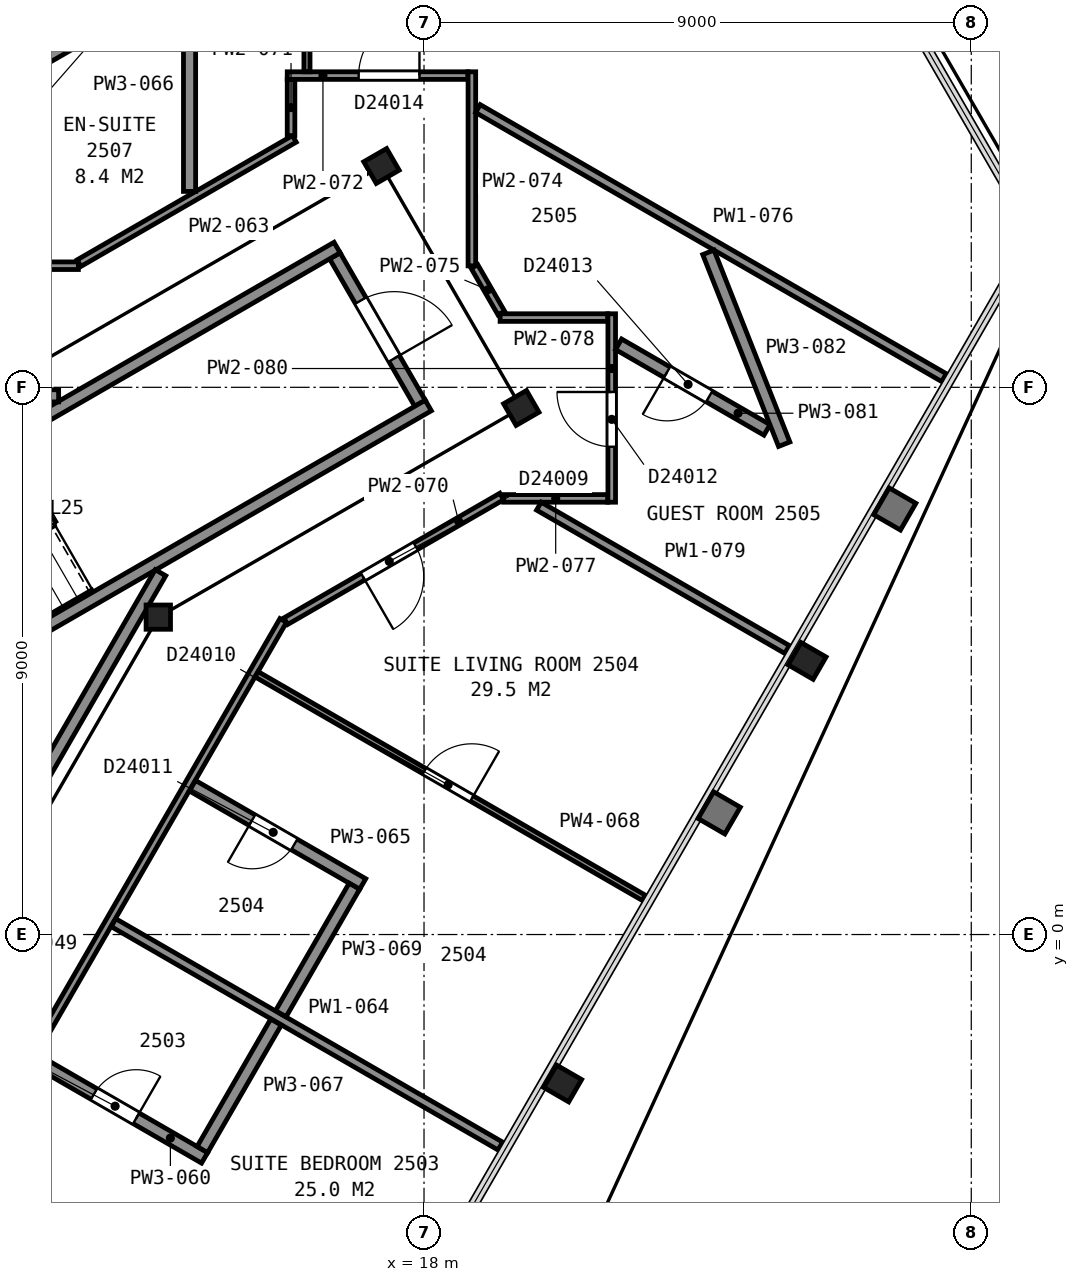
"""IFC4 building model, lengths in metres.
Left out: names, types, materials, properties, quantities, classifications, styles, units other than length and angle.
Written with IfcOpenShell. Run it as: python <this file> out.ifc"""

import sys

from ifc_helpers import new_model, si_unit, direction, frame, frame_2d, origin, origin_2d, place, context, subcontext, project, spatial, rectangle, i_section, extrude, element, fill, save


model = new_model("IFC4")
c1 = context("Model", 3, precision=1e-05, world=origin(), true_north=direction((0.0, 1.0)))
c2 = subcontext(c1, "Body", "Model", "MODEL_VIEW")
j1 = project(units=[si_unit("LENGTHUNIT", "METRE"), si_unit("PLANEANGLEUNIT", "RADIAN")], contexts=[c1])
p1 = place(None, origin())
s1 = spatial("IfcSite", under=j1, at=p1, CompositionType="ELEMENT")
p2 = place(p1, origin())
s2 = spatial("IfcBuilding", under=s1, at=p2, CompositionType="ELEMENT")
p3 = place(p2, frame((0.0, 0.0, 107.2)))
s3 = spatial("IfcBuildingStorey", under=s2, at=p3, CompositionType="ELEMENT", Elevation=107.2)
for number, where, z_axis, x_axis in (
    (1, (20.28, -2.45, 0.0), (0.0, 0.0, 1.0), (-0.5, -0.866, 0.0)),
    (2, (24.3, 4.5, 0.0), (0.0, 0.0, 1.0), (-0.5, -0.866, 0.0)),
):
    element("IfcColumn", number, at=place(p3, frame(where, z_axis=z_axis, x_axis=x_axis)), inside=s3, PredefinedType="COLUMN", context=c2, shape_type="SweptSolid", body=[
        extrude(i_section(OverallWidth=0.424, OverallDepth=0.475, WebThickness=0.048, FlangeThickness=0.077, FilletRadius=0.015, at=origin_2d()), origin(), (0.0, 0.0, 1.0), 3.6),
    ])
p4 = place(p3, frame((13.63, 5.22, 0.0), z_axis=(0.0, 0.0, 1.0), x_axis=(1.0, 0.0, 0.0)))
e3 = element("IfcColumn", 3, at=p4, inside=s3, PredefinedType="COLUMN", context=c2, shape_type="SweptSolid", body=[
    extrude(i_section(OverallWidth=0.401, OverallDepth=0.399, WebThickness=0.025, FlangeThickness=0.04, FilletRadius=0.015, at=origin_2d()), origin(), (0.0, 0.0, 1.0), 3.6),
])
for number, where, z_axis, x_axis in (
    (4, (19.6, 8.66, 0.0), (0.0, 0.0, 1.0), (0.5, -0.866, 0.0)),
    (5, (17.3, 12.64, 0.0), (0.0, 0.0, 1.0), (0.5, -0.866, 0.0)),
):
    element("IfcColumn", number, at=place(p3, frame(where, z_axis=z_axis, x_axis=x_axis)), inside=s3, PredefinedType="COLUMN", context=c2, shape_type="SweptSolid", body=[
        extrude(i_section(OverallWidth=0.411, OverallDepth=0.434, WebThickness=0.036, FlangeThickness=0.057, FilletRadius=0.015, at=origin_2d()), origin(), (0.0, 0.0, 1.0), 3.6),
    ])
p5 = place(p3, frame((17.934, 8.738, 0.0), z_axis=(0.0, 0.0, 1.0), x_axis=(-0.49998411664, 0.866034573852, 0.0)))
e6 = element("IfcWall", 6, at=p5, inside=s3, PredefinedType="PARTITIONING", context=c2, shape_type="SweptSolid", body=[
    extrude(rectangle(XDim=2.8, YDim=0.2, at=frame_2d((1.4, 0.0))), origin(), (0.0, 0.0, 1.0), 3.35),
])
p6 = place(p5, frame((0.85, 0.0, 0.0)))
e7 = element("IfcOpeningElement", 7, at=p6, cuts=e6, PredefinedType="OPENING", context=c2, shape_type="SweptSolid", body=[
    extrude(rectangle(XDim=1.1, YDim=2.1, at=frame_2d((0.55, 1.05))), frame((0.0, 0.11, 0.0), z_axis=(0.0, -1.0, 0.0), x_axis=(1.0, 0.0, 0.0)), (0.0, 0.0, 1.0), 0.22),
])
for number, where, z_axis, x_axis in (
    (8, (6.178, 5.299, 0.0), (0.0, 0.0, 1.0), (0.866, 0.5, 0.0)),
    (9, (7.678, 2.701, 0.0), (0.0, 0.0, 1.0), (0.866, 0.5, 0.0)),
):
    element("IfcWall", number, at=place(p3, frame(where, z_axis=z_axis, x_axis=x_axis)), inside=s3, PredefinedType="PARTITIONING", context=c2, shape_type="SweptSolid", body=[
        extrude(rectangle(XDim=12.0, YDim=0.2, at=frame_2d((6.0, 0.0))), origin(), (0.0, 0.0, 1.0), 3.35),
    ])
p7 = place(p3, frame((6.177, 8.86, 0.0), z_axis=(0.0, 0.0, 1.0), x_axis=(1.0, 0.0, 0.0)))
e10 = element("IfcWall", 10, at=p7, inside=s3, PredefinedType="PARTITIONING", context=c2, shape_type="SweptSolid", body=[
    extrude(rectangle(XDim=5.814, YDim=0.2, at=frame_2d((2.907, 0.0))), origin(), (0.0, 0.0, 1.0), 3.35),
])
p8 = place(p3, frame((8.492, -3.012, 0.0), z_axis=(0.0, 0.0, 1.0), x_axis=(0.499972957231, 0.866041016371, 0.0)))
e11 = element("IfcWall", 11, at=p8, inside=s3, PredefinedType="PARTITIONING", context=c2, shape_type="SweptSolid", body=[
    extrude(rectangle(XDim=10.349, YDim=0.2, at=frame_2d((5.174, 0.0))), origin(), (0.0, 0.0, 1.0), 3.35),
])
p9 = place(p3, frame((-12.315, 11.0, 0.0), z_axis=(0.0, 0.0, 1.0), x_axis=(1.0, 0.0, 0.0)))
e12 = element("IfcWall", 12, at=p9, inside=s3, PredefinedType="PARTITIONING", context=c2, shape_type="SweptSolid", body=[
    extrude(rectangle(XDim=24.631, YDim=0.125, at=frame_2d((12.315, 0.0))), origin(), (0.0, 0.0, 1.0), 2.613),
])
p10 = place(p9, frame((16.545, 0.0, 0.0)))
e13 = element("IfcOpeningElement", 13, at=p10, cuts=e12, PredefinedType="OPENING", context=c2, shape_type="SweptSolid", body=[
    extrude(rectangle(XDim=1.0, YDim=2.1, at=frame_2d((0.5, 1.05))), frame((0.0, 0.073, 0.0), z_axis=(0.0, -1.0, 0.0), x_axis=(1.0, 0.0, 0.0)), (0.0, 0.0, 1.0), 0.145),
])
p11 = place(p9, frame((12.986, 0.0, 0.0)))
e14 = element("IfcOpeningElement", 14, at=p11, cuts=e12, PredefinedType="OPENING", context=c2, shape_type="SweptSolid", body=[
    extrude(rectangle(XDim=0.9, YDim=2.1, at=frame_2d((0.45, 1.05))), frame((0.0, 0.073, 0.0), z_axis=(0.0, -1.0, 0.0), x_axis=(1.0, 0.0, 0.0)), (0.0, 0.0, 1.0), 0.145),
])
p12 = place(p9, frame((2.521, 0.0, 0.0)))
e15 = element("IfcOpeningElement", 15, at=p12, cuts=e12, PredefinedType="OPENING", context=c2, shape_type="SweptSolid", body=[
    extrude(rectangle(XDim=1.0, YDim=2.1, at=frame_2d((0.5, 1.05))), frame((0.0, 0.073, 0.0), z_axis=(0.0, -1.0, 0.0), x_axis=(1.0, 0.0, 0.0)), (0.0, 0.0, 1.0), 0.145),
])
p13 = place(p3, frame((15.684, 5.165, 0.0), z_axis=(0.0, 0.0, 1.0), x_axis=(-0.500027787016, -0.866009360349, 0.0)))
e16 = element("IfcWall", 16, at=p13, inside=s3, PredefinedType="PARTITIONING", context=c2, shape_type="SweptSolid", body=[
    extrude(rectangle(XDim=23.856, YDim=0.125, at=frame_2d((11.928, 0.0))), origin(), (0.0, 0.0, 1.0), 2.613),
])
p14 = place(p13, frame((16.996, 0.0, 0.0)))
e17 = element("IfcOpeningElement", 17, at=p14, cuts=e16, PredefinedType="OPENING", context=c2, shape_type="SweptSolid", body=[
    extrude(rectangle(XDim=1.0, YDim=2.1, at=frame_2d((0.5, 1.05))), frame((0.0, 0.073, 0.0), z_axis=(0.0, -1.0, 0.0), x_axis=(1.0, 0.0, 0.0)), (0.0, 0.0, 1.0), 0.145),
])
p15 = place(p13, frame((12.28, 0.0, 0.0)))
e18 = element("IfcOpeningElement", 18, at=p15, cuts=e16, PredefinedType="OPENING", context=c2, shape_type="SweptSolid", body=[
    extrude(rectangle(XDim=1.0, YDim=2.1, at=frame_2d((0.5, 1.05))), frame((0.0, 0.073, 0.0), z_axis=(0.0, -1.0, 0.0), x_axis=(1.0, 0.0, 0.0)), (0.0, 0.0, 1.0), 0.145),
])
p16 = place(p3, frame((10.53, -3.886, 0.0), z_axis=(0.0, 0.0, 1.0), x_axis=(0.8660606245, -0.499938990969, 0.0)))
e19 = element("IfcWall", 19, at=p16, inside=s3, PredefinedType="PARTITIONING", context=c2, shape_type="SweptSolid", body=[
    extrude(rectangle(XDim=7.353, YDim=0.1, at=frame_2d((3.676, 0.0))), origin(), (0.0, 0.0, 1.0), 2.613),
])
p17 = place(p16, frame((3.188, 0.0, 0.0)))
e20 = element("IfcOpeningElement", 20, at=p17, cuts=e19, PredefinedType="OPENING", context=c2, shape_type="SweptSolid", body=[
    extrude(rectangle(XDim=0.9, YDim=2.1, at=frame_2d((0.45, 1.05))), frame((0.0, 0.06, 0.0), z_axis=(0.0, -1.0, 0.0), x_axis=(1.0, 0.0, 0.0)), (0.0, 0.0, 1.0), 0.12),
])
p18 = place(p3, frame((11.588, -2.054, 0.0), z_axis=(0.0, 0.0, 1.0), x_axis=(0.865983377851, -0.500072783988, 0.0)))
e21 = element("IfcWall", 21, at=p18, inside=s3, PredefinedType="PARTITIONING", context=c2, shape_type="SweptSolid", body=[
    extrude(rectangle(XDim=3.237, YDim=0.2, at=frame_2d((1.619, 0.0))), origin(), (0.0, 0.0, 1.0), 2.613),
])
p19 = place(p18, frame((1.137, 0.0, 0.0)))
e22 = element("IfcOpeningElement", 22, at=p19, cuts=e21, PredefinedType="OPENING", context=c2, shape_type="SweptSolid", body=[
    extrude(rectangle(XDim=0.8, YDim=2.1, at=frame_2d((0.4, 1.05))), frame((0.0, 0.11, 0.0), z_axis=(0.0, -1.0, 0.0), x_axis=(1.0, 0.0, 0.0)), (0.0, 0.0, 1.0), 0.22),
])
p20 = place(p3, frame((13.997, 15.702, 0.0), z_axis=(0.0, 0.0, 1.0), x_axis=(-0.866066100916, -0.499929503874, 0.0)))
e23 = element("IfcWall", 23, at=p20, inside=s3, PredefinedType="PARTITIONING", context=c2, shape_type="SweptSolid", body=[
    extrude(rectangle(XDim=2.688, YDim=0.2, at=frame_2d((1.344, 0.0))), origin(), (0.0, 0.0, 1.0), 2.613),
])
p21 = place(p20, frame((0.932, 0.0, 0.0)))
e24 = element("IfcOpeningElement", 24, at=p21, cuts=e23, PredefinedType="OPENING", context=c2, shape_type="SweptSolid", body=[
    extrude(rectangle(XDim=0.8, YDim=2.1, at=frame_2d((0.4, 1.05))), frame((0.0, 0.11, 0.0), z_axis=(0.0, -1.0, 0.0), x_axis=(1.0, 0.0, 0.0)), (0.0, 0.0, 1.0), 0.22),
])
p22 = place(p3, frame((12.327, 11.042, 0.0), z_axis=(0.0, 0.0, 1.0), x_axis=(0.866070231021, 0.499922348909, 0.0)))
e25 = element("IfcWall", 25, at=p22, inside=s3, PredefinedType="PARTITIONING", context=c2, shape_type="SweptSolid", body=[
    extrude(rectangle(XDim=4.088, YDim=0.125, at=frame_2d((2.044, 0.0))), origin(), (0.0, 0.0, 1.0), 2.613),
])
p23 = place(p3, frame((12.893, 0.195, 0.0), z_axis=(0.0, 0.0, 1.0), x_axis=(0.865995225926, -0.500052265941, 0.0)))
e26 = element("IfcWall", 26, at=p23, inside=s3, PredefinedType="PARTITIONING", context=c2, shape_type="SweptSolid", body=[
    extrude(rectangle(XDim=7.347, YDim=0.15, at=frame_2d((3.674, 0.0))), origin(), (0.0, 0.0, 1.0), 2.613),
])
p24 = place(p3, frame((16.992, 0.831, 0.0), z_axis=(0.0, 0.0, 1.0), x_axis=(-0.866022073929, 0.500005767435, 0.0)))
e27 = element("IfcWall", 27, at=p24, inside=s3, PredefinedType="PARTITIONING", context=c2, shape_type="SweptSolid", body=[
    extrude(rectangle(XDim=3.232, YDim=0.2, at=frame_2d((1.616, 0.0))), origin(), (0.0, 0.0, 1.0), 2.613),
])
p25 = place(p24, frame((1.3, 0.0, 0.0)))
e28 = element("IfcOpeningElement", 28, at=p25, cuts=e27, PredefinedType="OPENING", context=c2, shape_type="SweptSolid", body=[
    extrude(rectangle(XDim=0.8, YDim=2.1, at=frame_2d((0.4, 1.05))), frame((0.0, 0.11, 0.0), z_axis=(0.0, -1.0, 0.0), x_axis=(1.0, 0.0, 0.0)), (0.0, 0.0, 1.0), 0.22),
])
p26 = place(p3, frame((14.144, 12.222, 0.0), z_axis=(0.0, 0.0, 1.0), x_axis=(0.0, 1.0, 0.0)))
e29 = element("IfcWall", 29, at=p26, inside=s3, PredefinedType="PARTITIONING", context=c2, shape_type="SweptSolid", body=[
    extrude(rectangle(XDim=3.665, YDim=0.2, at=frame_2d((1.833, 0.0))), origin(), (0.0, 0.0, 1.0), 2.613),
])
p27 = place(p3, frame((14.355, -3.536, 0.0), z_axis=(0.0, 0.0, 1.0), x_axis=(0.50002218001, 0.866012597771, 0.0)))
e30 = element("IfcWall", 30, at=p27, inside=s3, PredefinedType="PARTITIONING", context=c2, shape_type="SweptSolid", body=[
    extrude(rectangle(XDim=2.421, YDim=0.2, at=frame_2d((1.21, 0.0))), origin(), (0.0, 0.0, 1.0), 2.613),
])
p28 = place(p3, frame((21.613, 0.605, 0.0), z_axis=(0.0, 0.0, 1.0), x_axis=(-0.866021344046, 0.500007031608, 0.0)))
e31 = element("IfcWall", 31, at=p28, inside=s3, PredefinedType="PARTITIONING", context=c2, shape_type="SweptSolid", body=[
    extrude(rectangle(XDim=7.352, YDim=0.1, at=frame_2d((3.676, 0.0))), origin(), (0.0, 0.0, 1.0), 2.613),
])
p29 = place(p28, frame((3.264, 0.0, 0.0)))
e32 = element("IfcOpeningElement", 32, at=p29, cuts=e31, PredefinedType="OPENING", context=c2, shape_type="SweptSolid", body=[
    extrude(rectangle(XDim=0.9, YDim=2.1, at=frame_2d((0.45, 1.05))), frame((0.0, 0.06, 0.0), z_axis=(0.0, -1.0, 0.0), x_axis=(1.0, 0.0, 0.0)), (0.0, 0.0, 1.0), 0.12),
])
p30 = place(p3, frame((15.646, -1.302, 0.0), z_axis=(0.0, 0.0, 1.0), x_axis=(0.499719542643, 0.866187265377, 0.0)))
e33 = element("IfcWall", 33, at=p30, inside=s3, PredefinedType="PARTITIONING", context=c2, shape_type="SweptSolid", body=[
    extrude(rectangle(XDim=2.42, YDim=0.2, at=frame_2d((1.21, 0.0))), origin(), (0.0, 0.0, 1.0), 2.613),
])
p31 = place(p3, frame((19.278, 7.204, 0.0), z_axis=(0.0, 0.0, 1.0), x_axis=(-0.865992261418, -0.50005739987, 0.0)))
e34 = element("IfcWall", 34, at=p31, inside=s3, PredefinedType="PARTITIONING", context=c2, shape_type="SweptSolid", body=[
    extrude(rectangle(XDim=4.101, YDim=0.125, at=frame_2d((2.051, 0.0))), origin(), (0.0, 0.0, 1.0), 2.613),
])
p32 = place(p31, frame((1.636, 0.0, 0.0)))
e35 = element("IfcOpeningElement", 35, at=p32, cuts=e34, PredefinedType="OPENING", context=c2, shape_type="SweptSolid", body=[
    extrude(rectangle(XDim=1.0, YDim=2.1, at=frame_2d((0.5, 1.05))), frame((0.0, 0.073, 0.0), z_axis=(0.0, -1.0, 0.0), x_axis=(1.0, 0.0, 0.0)), (0.0, 0.0, 1.0), 0.145),
])
p33 = place(p3, frame((15.813, 13.14, 0.0), z_axis=(0.0, 0.0, 1.0), x_axis=(0.0, 1.0, 0.0)))
e36 = element("IfcWall", 36, at=p33, inside=s3, PredefinedType="PARTITIONING", context=c2, shape_type="SweptSolid", body=[
    extrude(rectangle(XDim=0.922, YDim=0.125, at=frame_2d((0.461, 0.0))), origin(), (0.0, 0.0, 1.0), 2.613),
])
p34 = place(p3, frame((15.75, 14.127, 0.0), z_axis=(0.0, 0.0, 1.0), x_axis=(1.0, 0.0, 0.0)))
e37 = element("IfcWall", 37, at=p34, inside=s3, PredefinedType="PARTITIONING", context=c2, shape_type="SweptSolid", body=[
    extrude(rectangle(XDim=2.971, YDim=0.125, at=frame_2d((1.486, 0.0))), origin(), (0.0, 0.0, 1.0), 2.613),
])
p35 = place(p34, frame((1.175, 0.0, 0.0)))
e38 = element("IfcOpeningElement", 38, at=p35, cuts=e37, PredefinedType="OPENING", context=c2, shape_type="SweptSolid", body=[
    extrude(rectangle(XDim=1.0, YDim=2.1, at=frame_2d((0.5, 1.05))), frame((0.0, 0.073, 0.0), z_axis=(0.0, -1.0, 0.0), x_axis=(1.0, 0.0, 0.0)), (0.0, 0.0, 1.0), 0.145),
])
p36 = place(p3, frame((16.075, 14.189, 0.0), z_axis=(0.0, 0.0, 1.0), x_axis=(0.0, 1.0, 0.0)))
e39 = element("IfcWall", 39, at=p36, inside=s3, PredefinedType="PARTITIONING", context=c2, shape_type="SweptSolid", body=[
    extrude(rectangle(XDim=4.226, YDim=0.1, at=frame_2d((2.113, 0.0))), origin(), (0.0, 0.0, 1.0), 2.613),
])
p37 = place(p36, frame((1.587, 0.0, 0.0)))
e40 = element("IfcOpeningElement", 40, at=p37, cuts=e39, PredefinedType="OPENING", context=c2, shape_type="SweptSolid", body=[
    extrude(rectangle(XDim=0.9, YDim=2.1, at=frame_2d((0.45, 1.05))), frame((0.0, 0.06, 0.0), z_axis=(0.0, -1.0, 0.0), x_axis=(1.0, 0.0, 0.0)), (0.0, 0.0, 1.0), 0.12),
])
p38 = place(p3, frame((18.787, 10.998, 0.0), z_axis=(0.0, 0.0, 1.0), x_axis=(0.0, 1.0, 0.0)))
e41 = element("IfcWall", 41, at=p38, inside=s3, PredefinedType="PARTITIONING", context=c2, shape_type="SweptSolid", body=[
    extrude(rectangle(XDim=3.192, YDim=0.125, at=frame_2d((1.596, 0.0))), origin(), (0.0, 0.0, 1.0), 2.613),
])
p39 = place(p3, frame((18.83, 10.986, 0.0), z_axis=(0.0, 0.0, 1.0), x_axis=(0.499881837328, -0.866093614288, 0.0)))
e42 = element("IfcWall", 42, at=p39, inside=s3, PredefinedType="PARTITIONING", context=c2, shape_type="SweptSolid", body=[
    extrude(rectangle(XDim=0.884, YDim=0.125, at=frame_2d((0.442, 0.0))), origin(), (0.0, 0.0, 1.0), 2.613),
])
p40 = place(p3, frame((18.887, 13.584, 0.0), z_axis=(0.0, 0.0, 1.0), x_axis=(0.866024349092, -0.500001826776, 0.0)))
e43 = element("IfcWall", 43, at=p40, inside=s3, PredefinedType="PARTITIONING", context=c2, shape_type="SweptSolid", body=[
    extrude(rectangle(XDim=8.851, YDim=0.15, at=frame_2d((4.425, 0.0))), origin(), (0.0, 0.0, 1.0), 2.613),
])
p41 = place(p3, frame((19.309, 7.173, 0.0), z_axis=(0.0, 0.0, 1.0), x_axis=(1.0, 0.0, 0.0)))
e44 = element("IfcWall", 44, at=p41, inside=s3, PredefinedType="PARTITIONING", context=c2, shape_type="SweptSolid", body=[
    extrude(rectangle(XDim=1.713, YDim=0.125, at=frame_2d((0.856, 0.0))), origin(), (0.0, 0.0, 1.0), 2.613),
])
p42 = place(p3, frame((19.251, 10.147, 0.0), z_axis=(0.0, 0.0, 1.0), x_axis=(1.0, 0.0, 0.0)))
e45 = element("IfcWall", 45, at=p42, inside=s3, PredefinedType="PARTITIONING", context=c2, shape_type="SweptSolid", body=[
    extrude(rectangle(XDim=1.771, YDim=0.125, at=frame_2d((0.885, 0.0))), origin(), (0.0, 0.0, 1.0), 2.613),
])
p43 = place(p3, frame((19.889, 7.046, 0.0), z_axis=(0.0, 0.0, 1.0), x_axis=(0.865929380849, -0.500166279733, 0.0)))
e46 = element("IfcWall", 46, at=p43, inside=s3, PredefinedType="PARTITIONING", context=c2, shape_type="SweptSolid", body=[
    extrude(rectangle(XDim=4.714, YDim=0.15, at=frame_2d((2.357, 0.0))), origin(), (0.0, 0.0, 1.0), 2.613),
])
p44 = place(p3, frame((21.087, 10.209, 0.0), z_axis=(0.0, 0.0, 1.0), x_axis=(0.0, -1.0, 0.0)))
e47 = element("IfcWall", 47, at=p44, inside=s3, PredefinedType="PARTITIONING", context=c2, shape_type="SweptSolid", body=[
    extrude(rectangle(XDim=3.099, YDim=0.125, at=frame_2d((1.549, 0.0))), origin(), (0.0, 0.0, 1.0), 2.613),
])
p45 = place(p44, frame((1.287, 0.0, 0.0)))
e48 = element("IfcOpeningElement", 48, at=p45, cuts=e47, PredefinedType="OPENING", context=c2, shape_type="SweptSolid", body=[
    extrude(rectangle(XDim=0.9, YDim=2.1, at=frame_2d((0.45, 1.05))), frame((0.0, 0.073, 0.0), z_axis=(0.0, -1.0, 0.0), x_axis=(1.0, 0.0, 0.0)), (0.0, 0.0, 1.0), 0.145),
])
p46 = place(p3, frame((21.199, 9.708, 0.0), z_axis=(0.0, 0.0, 1.0), x_axis=(0.866129327763, -0.499819955173, 0.0)))
e49 = element("IfcWall", 49, at=p46, inside=s3, PredefinedType="PARTITIONING", context=c2, shape_type="SweptSolid", body=[
    extrude(rectangle(XDim=2.818, YDim=0.2, at=frame_2d((1.409, 0.0))), origin(), (0.0, 0.0, 1.0), 2.613),
])
p47 = place(p46, frame((0.92, 0.0, 0.0)))
e50 = element("IfcOpeningElement", 50, at=p47, cuts=e49, PredefinedType="OPENING", context=c2, shape_type="SweptSolid", body=[
    extrude(rectangle(XDim=0.8, YDim=2.1, at=frame_2d((0.4, 1.05))), frame((0.0, 0.11, 0.0), z_axis=(0.0, -1.0, 0.0), x_axis=(1.0, 0.0, 0.0)), (0.0, 0.0, 1.0), 0.22),
])
p48 = place(p3, frame((22.677, 11.22, 0.0), z_axis=(0.0, 0.0, 1.0), x_axis=(0.36751707294, -0.930016774632, 0.0)))
e51 = element("IfcWall", 51, at=p48, inside=s3, PredefinedType="PARTITIONING", context=c2, shape_type="SweptSolid", body=[
    extrude(rectangle(XDim=3.393, YDim=0.2, at=frame_2d((1.697, 0.0))), origin(), (0.0, 0.0, 1.0), 2.613),
])
p49 = place(p6, origin())
e52 = element("IfcDoor", 52, at=p49, inside=s3, OperationType="SINGLE_SWING_LEFT", PredefinedType="DOOR", context=c2, shape_type="SweptSolid", body=[
    extrude(rectangle(XDim=1.1, YDim=2.1, at=frame_2d((0.55, 1.05))), frame((0.0, 0.025, 0.0), z_axis=(0.0, -1.0, 0.0), x_axis=(1.0, 0.0, 0.0)), (0.0, 0.0, 1.0), 0.05),
])
fill(e7, e52)
p50 = place(p19, origin())
e53 = element("IfcDoor", 53, at=p50, inside=s3, OperationType="SINGLE_SWING_RIGHT", PredefinedType="DOOR", context=c2, shape_type="SweptSolid", body=[
    extrude(rectangle(XDim=0.8, YDim=2.1, at=frame_2d((0.4, 1.05))), frame((0.0, 0.025, 0.0), z_axis=(0.0, -1.0, 0.0), x_axis=(1.0, 0.0, 0.0)), (0.0, 0.0, 1.0), 0.05),
])
fill(e22, e53)
p51 = place(p25, origin())
e54 = element("IfcDoor", 54, at=p51, inside=s3, OperationType="SINGLE_SWING_RIGHT", PredefinedType="DOOR", context=c2, shape_type="SweptSolid", body=[
    extrude(rectangle(XDim=0.8, YDim=2.1, at=frame_2d((0.4, 1.05))), frame((0.0, 0.025, 0.0), z_axis=(0.0, -1.0, 0.0), x_axis=(1.0, 0.0, 0.0)), (0.0, 0.0, 1.0), 0.05),
])
fill(e28, e54)
p52 = place(p29, origin())
e55 = element("IfcDoor", 55, at=p52, inside=s3, OperationType="SINGLE_SWING_LEFT", PredefinedType="DOOR", context=c2, shape_type="SweptSolid", body=[
    extrude(rectangle(XDim=0.9, YDim=2.1, at=frame_2d((0.45, 1.05))), frame((0.0, 0.025, 0.0), z_axis=(0.0, -1.0, 0.0), x_axis=(1.0, 0.0, 0.0)), (0.0, 0.0, 1.0), 0.05),
])
fill(e32, e55)
p53 = place(p32, origin())
e56 = element("IfcDoor", 56, at=p53, inside=s3, OperationType="SINGLE_SWING_RIGHT", PredefinedType="DOOR", context=c2, shape_type="SweptSolid", body=[
    extrude(rectangle(XDim=1.0, YDim=2.1, at=frame_2d((0.5, 1.05))), frame((0.0, 0.025, 0.0), z_axis=(0.0, -1.0, 0.0), x_axis=(1.0, 0.0, 0.0)), (0.0, 0.0, 1.0), 0.05),
])
fill(e35, e56)
p54 = place(p35, origin())
e57 = element("IfcDoor", 57, at=p54, inside=s3, OperationType="SINGLE_SWING_RIGHT", PredefinedType="DOOR", context=c2, shape_type="SweptSolid", body=[
    extrude(rectangle(XDim=1.0, YDim=2.1, at=frame_2d((0.5, 1.05))), frame((0.0, 0.025, 0.0), z_axis=(0.0, -1.0, 0.0), x_axis=(1.0, 0.0, 0.0)), (0.0, 0.0, 1.0), 0.05),
])
fill(e38, e57)
p55 = place(p45, origin())
e58 = element("IfcDoor", 58, at=p55, inside=s3, OperationType="SINGLE_SWING_LEFT", PredefinedType="DOOR", context=c2, shape_type="SweptSolid", body=[
    extrude(rectangle(XDim=0.9, YDim=2.1, at=frame_2d((0.45, 1.05))), frame((0.0, 0.025, 0.0), z_axis=(0.0, -1.0, 0.0), x_axis=(1.0, 0.0, 0.0)), (0.0, 0.0, 1.0), 0.05),
])
fill(e48, e58)
p56 = place(p47, origin())
e59 = element("IfcDoor", 59, at=p56, inside=s3, OperationType="SINGLE_SWING_LEFT", PredefinedType="DOOR", context=c2, shape_type="SweptSolid", body=[
    extrude(rectangle(XDim=0.8, YDim=2.1, at=frame_2d((0.4, 1.05))), frame((0.0, 0.025, 0.0), z_axis=(0.0, -1.0, 0.0), x_axis=(1.0, 0.0, 0.0)), (0.0, 0.0, 1.0), 0.05),
])
fill(e50, e59)
save(model, sys.argv[1])
